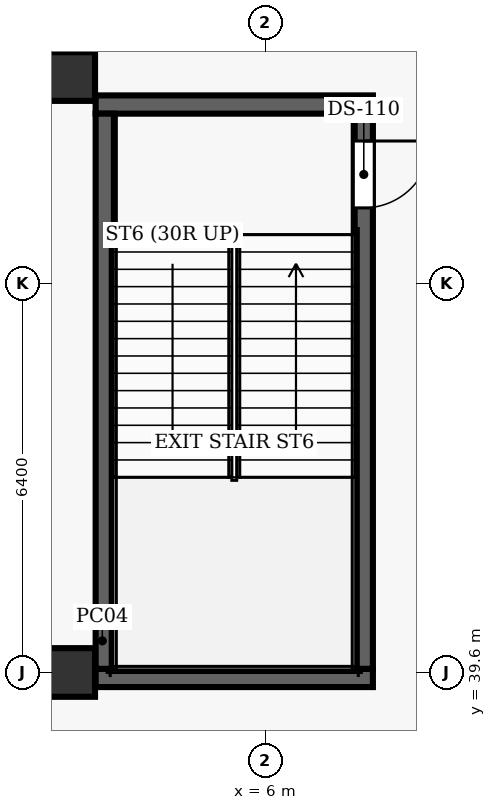
"""IFC4 building model, lengths in metres.
Left out: names, types, materials, properties, quantities, classifications, styles, units other than length and angle.
Written with IfcOpenShell. Run it as: python <this file> out.ifc"""

import sys

from ifc_helpers import new_model, si_unit, direction, frame, frame_2d, origin, origin_2d, place, context, subcontext, project, spatial, rectangle, extrude, element, fill, save


model = new_model("IFC4")
c1 = context("Model", 3, precision=1e-05, world=origin(), true_north=direction((0.0, 1.0)))
c2 = subcontext(c1, "Body", "Model", "MODEL_VIEW")
j1 = project(units=[si_unit("LENGTHUNIT", "METRE"), si_unit("PLANEANGLEUNIT", "RADIAN")], contexts=[c1])
p1 = place(None, origin())
s1 = spatial("IfcSite", under=j1, at=p1, CompositionType="ELEMENT")
p2 = place(p1, origin())
s2 = spatial("IfcBuilding", under=s1, at=p2, CompositionType="ELEMENT")
p3 = place(p2, frame((0.0, 0.0, 18.6)))
s3 = spatial("IfcBuildingStorey", under=s2, at=p3, CompositionType="ELEMENT", Elevation=18.6)
for number, where, z_axis, x_axis in (
    (1, (2.8, 39.6, 0.0), (0.0, 0.0, 1.0), (1.0, 0.0, 0.0)),
    (2, (2.8, 49.4, 0.0), (0.0, 0.0, 1.0), (1.0, 0.0, 0.0)),
):
    element("IfcColumn", number, at=place(p3, frame(where, z_axis=z_axis, x_axis=x_axis)), inside=s3, PredefinedType="COLUMN", context=c2, shape_type="SweptSolid", body=[
        extrude(rectangle(XDim=0.8, YDim=0.8, at=origin_2d()), origin(), (0.0, 0.0, 1.0), 5.4),
    ])
for number, where, z_axis, x_axis in (
    (3, (3.21, 39.51, 0.0), (0.0, 0.0, 1.0), (1.0, 0.0, 0.0)),
    (4, (3.21, 48.94, 0.0), (0.0, 0.0, 1.0), (1.0, 0.0, 0.0)),
):
    element("IfcWall", number, at=place(p3, frame(where, z_axis=z_axis, x_axis=x_axis)), inside=s3, PredefinedType="SHEAR", context=c2, shape_type="SweptSolid", body=[
        extrude(rectangle(XDim=4.56, YDim=0.3, at=frame_2d((2.28, 0.0))), origin(), (0.0, 0.0, 1.0), 5.4),
    ])
p4 = place(p3, frame((3.36, 39.66, 0.0), z_axis=(0.0, 0.0, 1.0), x_axis=(0.0, 1.0, 0.0)))
e5 = element("IfcWall", 5, at=p4, inside=s3, PredefinedType="SHEAR", context=c2, shape_type="SweptSolid", body=[
    extrude(rectangle(XDim=9.13, YDim=0.3, at=frame_2d((4.565, 0.0))), origin(), (0.0, 0.0, 1.0), 5.4),
])
p5 = place(p3, frame((7.62, 48.79, 0.0), z_axis=(0.0, 0.0, 1.0), x_axis=(0.0, -1.0, 0.0)))
e6 = element("IfcWall", 6, at=p5, inside=s3, PredefinedType="SHEAR", context=c2, shape_type="SweptSolid", body=[
    extrude(rectangle(XDim=9.13, YDim=0.3, at=frame_2d((4.565, 0.0))), origin(), (0.0, 0.0, 1.0), 5.4),
])
p6 = place(p5, frame((0.45, 0.0, 0.0)))
e7 = element("IfcOpeningElement", 7, at=p6, cuts=e6, PredefinedType="OPENING", context=c2, shape_type="SweptSolid", body=[
    extrude(rectangle(XDim=1.1, YDim=2.15, at=frame_2d((0.55, 1.075))), frame((0.0, 0.16, 0.0), z_axis=(0.0, -1.0, 0.0), x_axis=(1.0, 0.0, 0.0)), (0.0, 0.0, 1.0), 0.32),
])
p7 = place(p6, origin())
e8 = element("IfcDoor", 8, at=p7, inside=s3, OperationType="SINGLE_SWING_LEFT", PredefinedType="DOOR", context=c2, shape_type="SweptSolid", body=[
    extrude(rectangle(XDim=1.1, YDim=2.15, at=frame_2d((0.55, 1.075))), frame((0.0, 0.025, 0.0), z_axis=(0.0, -1.0, 0.0), x_axis=(1.0, 0.0, 0.0)), (0.0, 0.0, 1.0), 0.05),
])
fill(e7, e8)
save(model, sys.argv[1])
